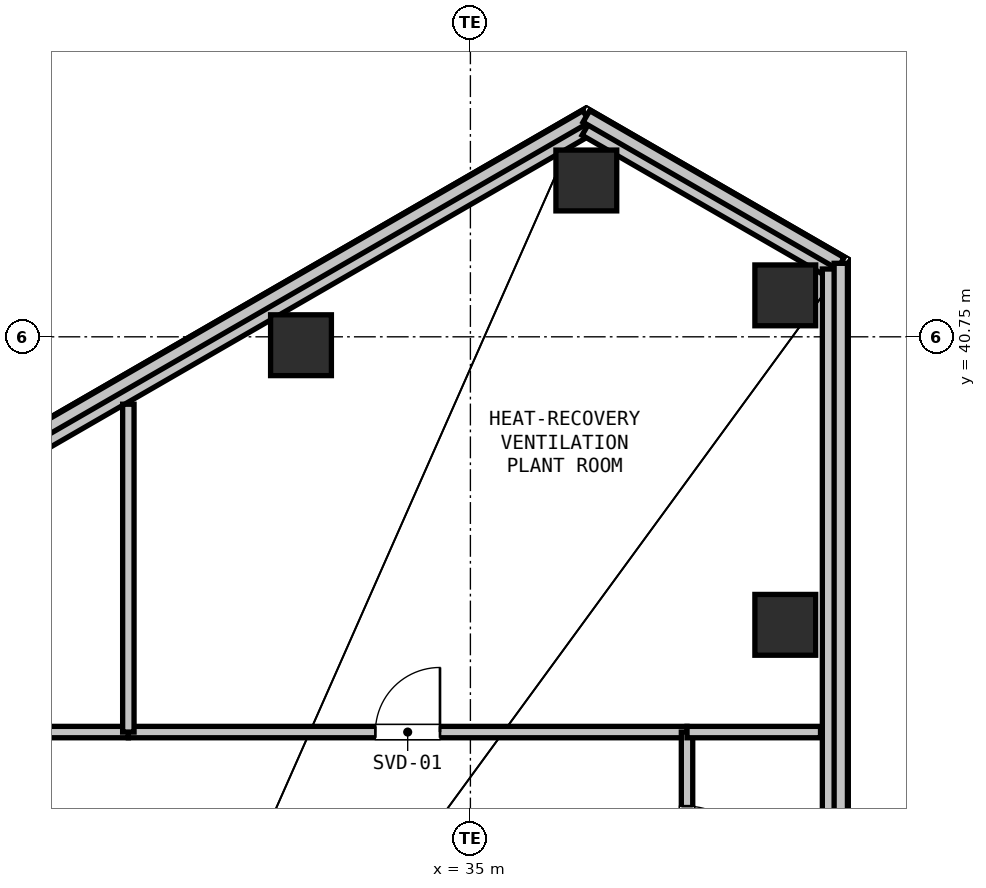
"""IFC4 building model, lengths in metres.
Left out: names, types, materials, properties, quantities, classifications, styles, units other than length and angle.
Written with IfcOpenShell. Run it as: python <this file> out.ifc"""

import sys

from ifc_helpers import new_model, si_unit, direction, frame, frame_2d, origin, origin_2d, place, context, subcontext, project, spatial, rectangle, hollow_rectangle, extrude, element, fill, save


model = new_model("IFC4")
c1 = context("Model", 3, precision=1e-05, world=origin(), true_north=direction((0.0, 1.0)))
c2 = subcontext(c1, "Body", "Model", "MODEL_VIEW")
j1 = project(units=[si_unit("LENGTHUNIT", "METRE"), si_unit("PLANEANGLEUNIT", "RADIAN")], contexts=[c1])
p1 = place(None, origin())
s1 = spatial("IfcSite", under=j1, at=p1, CompositionType="ELEMENT")
p2 = place(p1, origin())
s2 = spatial("IfcBuilding", under=s1, at=p2, CompositionType="ELEMENT")
p3 = place(p2, frame((0.0, 0.0, 264.0)))
s3 = spatial("IfcBuildingStorey", under=s2, at=p3, CompositionType="ELEMENT", Elevation=264.0)
for number, where, z_axis, x_axis in (
    (1, (32.771, 40.639, 0.0), (0.0, 0.0, 1.0), (1.0, 0.0, 0.0)),
    (2, (36.525, 42.807, 0.0), (0.0, 0.0, 1.0), (1.0, 0.0, 0.0)),
    (3, (39.143, 41.295, 0.0), (0.0, 0.0, 1.0), (1.0, 0.0, 0.0)),
    (4, (39.143, 36.961, 0.0), (0.0, 0.0, 1.0), (1.0, 0.0, 0.0)),
):
    element("IfcColumn", number, at=place(p3, frame(where, z_axis=z_axis, x_axis=x_axis)), inside=s3, PredefinedType="COLUMN", context=c2, shape_type="SweptSolid", body=[
        extrude(hollow_rectangle(XDim=0.8, YDim=0.8, WallThickness=0.025, at=origin_2d()), origin(), (0.0, 0.0, 1.0), 2.6),
    ])
p4 = place(p3, frame((10.732, 28.608, 0.0), z_axis=(0.0, 0.0, 1.0), x_axis=(0.866023553042, 0.500003205566, 0.0)))
e5 = element("IfcWall", 5, at=p4, inside=s3, PredefinedType="SOLIDWALL", context=c2, shape_type="SweptSolid", body=[
    extrude(rectangle(XDim=29.783, YDim=0.225, at=frame_2d((14.892, 0.0))), origin(), (0.0, 0.0, 1.0), 2.25),
])
p5 = place(p3, frame((10.602, 28.683, 2.7), z_axis=(0.0, 0.0, 1.0), x_axis=(0.866024093284, 0.500002269847, 0.0)))
e6 = element("IfcWall", 6, at=p5, inside=s3, PredefinedType="PARAPET", context=c2, shape_type="SweptSolid", body=[
    extrude(rectangle(XDim=29.933, YDim=0.175, at=frame_2d((14.967, 0.0))), origin(), (0.0, 0.0, 1.0), 1.2),
])
p6 = place(p3, frame((36.525, 43.5, 0.0), z_axis=(0.0, 0.0, 1.0), x_axis=(0.866038962515, -0.499976514854, 0.0)))
e7 = element("IfcWall", 7, at=p6, inside=s3, PredefinedType="SOLIDWALL", context=c2, shape_type="SweptSolid", body=[
    extrude(rectangle(XDim=3.716, YDim=0.225, at=frame_2d((1.858, 0.0))), origin(), (0.0, 0.0, 1.0), 2.25),
])
p7 = place(p3, frame((36.525, 43.649, 2.7), z_axis=(0.0, 0.0, 1.0), x_axis=(0.866042548026, -0.499970304126, 0.0)))
e8 = element("IfcWall", 8, at=p7, inside=s3, PredefinedType="PARAPET", context=c2, shape_type="SweptSolid", body=[
    extrude(rectangle(XDim=3.865, YDim=0.175, at=frame_2d((1.933, 0.0))), origin(), (0.0, 0.0, 1.0), 1.2),
])
p8 = place(p3, frame((39.743, 41.642, 0.0), z_axis=(0.0, 0.0, 1.0), x_axis=(0.0, -1.0, 0.0)))
e9 = element("IfcWall", 9, at=p8, inside=s3, PredefinedType="SOLIDWALL", context=c2, shape_type="SweptSolid", body=[
    extrude(rectangle(XDim=29.784, YDim=0.225, at=frame_2d((14.892, 0.0))), origin(), (0.0, 0.0, 1.0), 2.25),
])
p9 = place(p3, frame((39.873, 41.717, 2.7), z_axis=(0.0, 0.0, 1.0), x_axis=(0.0, -1.0, 0.0)))
e10 = element("IfcWall", 10, at=p9, inside=s3, PredefinedType="PARAPET", context=c2, shape_type="SweptSolid", body=[
    extrude(rectangle(XDim=29.934, YDim=0.175, at=frame_2d((14.967, 0.0))), origin(), (0.0, 0.0, 1.0), 1.2),
])
p10 = place(p3, frame((24.8, 35.55, 0.0), z_axis=(0.0, 0.0, 1.0), x_axis=(1.0, 0.0, 0.0)))
e11 = element("IfcWall", 11, at=p10, inside=s3, PredefinedType="PARTITIONING", context=c2, shape_type="SweptSolid", body=[
    extrude(rectangle(XDim=5.7, YDim=0.15, at=frame_2d((2.85, 0.0))), origin(), (0.0, 0.0, 1.0), 2.6),
])
p11 = place(p10, frame((2.425, 0.0, 0.0)))
e12 = element("IfcOpeningElement", 12, at=p11, cuts=e11, PredefinedType="OPENING", context=c2, shape_type="SweptSolid", body=[
    extrude(rectangle(XDim=0.85, YDim=2.1, at=frame_2d((0.425, 1.05))), frame((0.0, 0.085, 0.0), z_axis=(0.0, -1.0, 0.0), x_axis=(1.0, 0.0, 0.0)), (0.0, 0.0, 1.0), 0.17),
])
p12 = place(p3, frame((30.5, 35.55, 0.0), z_axis=(0.0, 0.0, 1.0), x_axis=(1.0, 0.0, 0.0)))
e13 = element("IfcWall", 13, at=p12, inside=s3, PredefinedType="PARTITIONING", context=c2, shape_type="SweptSolid", body=[
    extrude(rectangle(XDim=7.35, YDim=0.15, at=frame_2d((3.675, 0.0))), origin(), (0.0, 0.0, 1.0), 2.6),
])
p13 = place(p12, frame((3.25, 0.0, 0.0)))
e14 = element("IfcOpeningElement", 14, at=p13, cuts=e13, PredefinedType="OPENING", context=c2, shape_type="SweptSolid", body=[
    extrude(rectangle(XDim=0.85, YDim=2.1, at=frame_2d((0.425, 1.05))), frame((0.0, 0.085, 0.0), z_axis=(0.0, -1.0, 0.0), x_axis=(1.0, 0.0, 0.0)), (0.0, 0.0, 1.0), 0.17),
])
p14 = place(p3, frame((37.85, 35.55, 0.0), z_axis=(0.0, 0.0, 1.0), x_axis=(0.0, -1.0, 0.0)))
e15 = element("IfcWall", 15, at=p14, inside=s3, PredefinedType="PARTITIONING", context=c2, shape_type="SweptSolid", body=[
    extrude(rectangle(XDim=2.8, YDim=0.15, at=frame_2d((1.4, 0.0))), origin(), (0.0, 0.0, 1.0), 2.6),
])
p15 = place(p14, frame((0.975, 0.0, 0.0)))
e16 = element("IfcOpeningElement", 16, at=p15, cuts=e15, PredefinedType="OPENING", context=c2, shape_type="SweptSolid", body=[
    extrude(rectangle(XDim=0.85, YDim=2.1, at=frame_2d((0.425, 1.05))), frame((0.0, 0.085, 0.0), z_axis=(0.0, -1.0, 0.0), x_axis=(1.0, 0.0, 0.0)), (0.0, 0.0, 1.0), 0.17),
])
p16 = place(p3, frame((39.606, 35.55, 0.0), z_axis=(0.0, 0.0, 1.0), x_axis=(-1.0, 0.0, 0.0)))
e17 = element("IfcWall", 17, at=p16, inside=s3, PredefinedType="PARTITIONING", context=c2, shape_type="SweptSolid", body=[
    extrude(rectangle(XDim=1.756, YDim=0.15, at=frame_2d((0.878, 0.0))), origin(), (0.0, 0.0, 1.0), 2.105),
])
p17 = place(p3, frame((30.5, 35.55, 0.0), z_axis=(0.0, 0.0, 1.0), x_axis=(0.0, 1.0, 0.0)))
e18 = element("IfcWall", 18, at=p17, inside=s3, PredefinedType="PARTITIONING", context=c2, shape_type="SweptSolid", body=[
    extrude(rectangle(XDim=4.313, YDim=0.15, at=frame_2d((2.156, 0.0))), origin(), (0.0, 0.0, 1.0), 2.105),
])
p18 = place(p13, origin())
e19 = element("IfcDoor", 19, at=p18, inside=s3, OperationType="SINGLE_SWING_RIGHT", PredefinedType="DOOR", context=c2, shape_type="SweptSolid", body=[
    extrude(rectangle(XDim=0.85, YDim=2.1, at=frame_2d((0.425, 1.05))), frame((0.0, 0.025, 0.0), z_axis=(0.0, -1.0, 0.0), x_axis=(1.0, 0.0, 0.0)), (0.0, 0.0, 1.0), 0.05),
])
fill(e14, e19)
p19 = place(p15, origin())
e20 = element("IfcDoor", 20, at=p19, inside=s3, OperationType="SINGLE_SWING_RIGHT", PredefinedType="DOOR", context=c2, shape_type="SweptSolid", body=[
    extrude(rectangle(XDim=0.85, YDim=2.1, at=frame_2d((0.425, 1.05))), frame((0.0, 0.025, 0.0), z_axis=(0.0, -1.0, 0.0), x_axis=(1.0, 0.0, 0.0)), (0.0, 0.0, 1.0), 0.05),
])
fill(e16, e20)
save(model, sys.argv[1])
